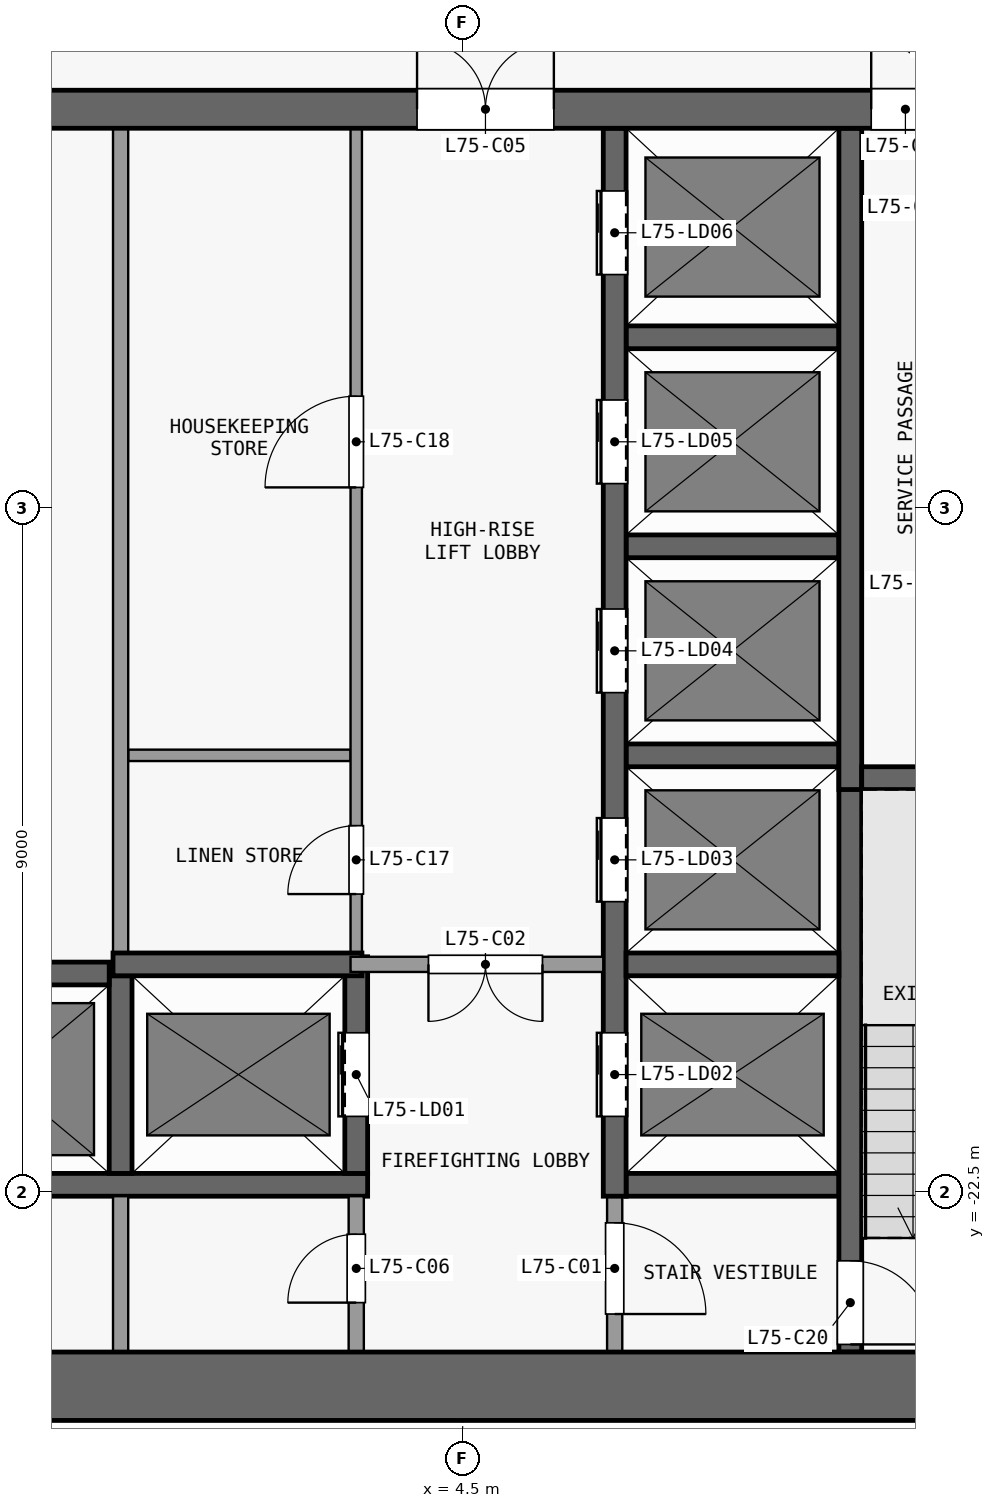
"""IFC4 building model, lengths in metres.
Left out: names, types, materials, properties, quantities, classifications, styles, units other than length and angle.
Written with IfcOpenShell. Run it as: python <this file> out.ifc"""

import sys

from ifc_helpers import new_model, si_unit, direction, frame, frame_2d, origin, place, context, subcontext, project, spatial, rectangle, extrude, element, fill, save


model = new_model("IFC4")
c1 = context("Model", 3, precision=1e-05, world=origin(), true_north=direction((0.0, 1.0)))
c2 = subcontext(c1, "Body", "Model", "MODEL_VIEW")
j1 = project(units=[si_unit("LENGTHUNIT", "METRE"), si_unit("PLANEANGLEUNIT", "RADIAN")], contexts=[c1])
p1 = place(None, origin())
s1 = spatial("IfcSite", under=j1, at=p1, CompositionType="ELEMENT")
p2 = place(p1, origin())
s2 = spatial("IfcBuilding", under=s1, at=p2, CompositionType="ELEMENT")
p3 = place(p2, frame((0.0, 0.0, 295.1)))
s3 = spatial("IfcBuildingStorey", under=s2, at=p3, CompositionType="ELEMENT", Elevation=295.1)
p4 = place(p3, frame((-13.1, -25.05, 0.0), z_axis=(0.0, 0.0, 1.0), x_axis=(1.0, 0.0, 0.0)))
e1 = element("IfcWall", 1, at=p4, inside=s3, PredefinedType="SHEAR", context=c2, shape_type="SweptSolid", body=[
    extrude(rectangle(XDim=26.2, YDim=0.9, at=frame_2d((13.1, 0.0))), origin(), (0.0, 0.0, 1.0), 3.2),
])
p5 = place(p3, frame((-13.1, -8.25, 0.0), z_axis=(0.0, 0.0, 1.0), x_axis=(1.0, 0.0, 0.0)))
e2 = element("IfcWall", 2, at=p5, inside=s3, PredefinedType="SHEAR", context=c2, shape_type="SweptSolid", body=[
    extrude(rectangle(XDim=26.2, YDim=0.5, at=frame_2d((13.1, 0.0))), origin(), (0.0, 0.0, 1.0), 3.2),
])
p6 = place(p5, frame((7.4, 0.0, 0.0)))
e3 = element("IfcOpeningElement", 3, at=p6, cuts=e2, PredefinedType="OPENING", context=c2, shape_type="SweptSolid", body=[
    extrude(rectangle(XDim=1.8, YDim=2.1, at=frame_2d((0.9, 1.05))), frame((0.0, 0.26, 0.0), z_axis=(0.0, -1.0, 0.0), x_axis=(1.0, 0.0, 0.0)), (0.0, 0.0, 1.0), 0.52),
])
p7 = place(p5, frame((17.0, 0.0, 0.0)))
e4 = element("IfcOpeningElement", 4, at=p7, cuts=e2, PredefinedType="OPENING", context=c2, shape_type="SweptSolid", body=[
    extrude(rectangle(XDim=1.8, YDim=2.1, at=frame_2d((0.9, 1.05))), frame((0.0, 0.26, 0.0), z_axis=(0.0, -1.0, 0.0), x_axis=(1.0, 0.0, 0.0)), (0.0, 0.0, 1.0), 0.52),
])
p8 = place(p5, frame((2.325, 0.0, 0.0)))
e5 = element("IfcOpeningElement", 5, at=p8, cuts=e2, PredefinedType="OPENING", context=c2, shape_type="SweptSolid", body=[
    extrude(rectangle(XDim=0.9, YDim=2.1, at=frame_2d((0.45, 1.05))), frame((0.0, 0.26, 0.0), z_axis=(0.0, -1.0, 0.0), x_axis=(1.0, 0.0, 0.0)), (0.0, 0.0, 1.0), 0.52),
])
p9 = place(p5, frame((22.975, 0.0, 0.0)))
e6 = element("IfcOpeningElement", 6, at=p9, cuts=e2, PredefinedType="OPENING", context=c2, shape_type="SweptSolid", body=[
    extrude(rectangle(XDim=0.9, YDim=2.1, at=frame_2d((0.45, 1.05))), frame((0.0, 0.26, 0.0), z_axis=(0.0, -1.0, 0.0), x_axis=(1.0, 0.0, 0.0)), (0.0, 0.0, 1.0), 0.52),
])
p10 = place(p3, frame((-3.25, -22.4, 0.0), z_axis=(0.0, 0.0, 1.0), x_axis=(1.0, 0.0, 0.0)))
e7 = element("IfcWall", 7, at=p10, inside=s3, PredefinedType="SHEAR", context=c2, shape_type="SweptSolid", body=[
    extrude(rectangle(XDim=6.5, YDim=0.3, at=frame_2d((3.25, 0.0))), origin(), (0.0, 0.0, 1.0), 3.2),
])
p11 = place(p3, frame((6.65, -22.4, 0.0), z_axis=(0.0, 0.0, 1.0), x_axis=(1.0, 0.0, 0.0)))
e8 = element("IfcWall", 8, at=p11, inside=s3, PredefinedType="SHEAR", context=c2, shape_type="SweptSolid", body=[
    extrude(rectangle(XDim=2.8, YDim=0.3, at=frame_2d((1.4, 0.0))), origin(), (0.0, 0.0, 1.0), 3.2),
])
p12 = place(p3, frame((-3.2, -19.62, 0.0), z_axis=(0.0, 0.0, 1.0), x_axis=(1.0, 0.0, 0.0)))
e9 = element("IfcWall", 9, at=p12, inside=s3, PredefinedType="SHEAR", context=c2, shape_type="SweptSolid", body=[
    extrude(rectangle(XDim=3.05, YDim=0.3, at=frame_2d((1.525, 0.0))), origin(), (0.0, 0.0, 1.0), 3.2),
])
p13 = place(p3, frame((-0.1, -19.5, 0.0), z_axis=(0.0, 0.0, 1.0), x_axis=(1.0, 0.0, 0.0)))
e10 = element("IfcWall", 10, at=p13, inside=s3, PredefinedType="SHEAR", context=c2, shape_type="SweptSolid", body=[
    extrude(rectangle(XDim=3.275, YDim=0.3, at=frame_2d((1.638, 0.0))), origin(), (0.0, 0.0, 1.0), 3.2),
])
p14 = place(p3, frame((6.35, -19.5, 0.0), z_axis=(0.0, 0.0, 1.0), x_axis=(-1.0, 0.0, 0.0)))
e11 = element("IfcWall", 11, at=p14, inside=s3, PredefinedType="PARTITIONING", context=c2, shape_type="SweptSolid", body=[
    extrude(rectangle(XDim=3.325, YDim=0.2, at=frame_2d((1.663, 0.0))), origin(), (0.0, 0.0, 1.0), 3.2),
])
p15 = place(p14, frame((0.8, 0.0, 0.0)))
e12 = element("IfcOpeningElement", 12, at=p15, cuts=e11, PredefinedType="OPENING", context=c2, shape_type="SweptSolid", body=[
    extrude(rectangle(XDim=1.5, YDim=2.1, at=frame_2d((0.75, 1.05))), frame((0.0, 0.11, 0.0), z_axis=(0.0, -1.0, 0.0), x_axis=(1.0, 0.0, 0.0)), (0.0, 0.0, 1.0), 0.22),
])
p16 = place(p3, frame((6.65, -19.5, 0.0), z_axis=(0.0, 0.0, 1.0), x_axis=(1.0, 0.0, 0.0)))
e13 = element("IfcWall", 13, at=p16, inside=s3, PredefinedType="SHEAR", context=c2, shape_type="SweptSolid", body=[
    extrude(rectangle(XDim=2.8, YDim=0.3, at=frame_2d((1.4, 0.0))), origin(), (0.0, 0.0, 1.0), 3.2),
])
p17 = place(p3, frame((9.75, -17.05, 0.0), z_axis=(0.0, 0.0, 1.0), x_axis=(1.0, 0.0, 0.0)))
e14 = element("IfcWall", 14, at=p17, inside=s3, PredefinedType="SHEAR", context=c2, shape_type="SweptSolid", body=[
    extrude(rectangle(XDim=2.85, YDim=0.3, at=frame_2d((1.425, 0.0))), origin(), (0.0, 0.0, 1.0), 3.2),
])
p18 = place(p3, frame((0.1, -16.75, 0.0), z_axis=(0.0, 0.0, 1.0), x_axis=(1.0, 0.0, 0.0)))
e15 = element("IfcWall", 15, at=p18, inside=s3, PredefinedType="PARTITIONING", context=c2, shape_type="SweptSolid", body=[
    extrude(rectangle(XDim=2.925, YDim=0.15, at=frame_2d((1.462, 0.0))), origin(), (0.0, 0.0, 1.0), 3.2),
])
for number, where, z_axis, x_axis in (
    (16, (6.65, -16.75, 0.0), (0.0, 0.0, 1.0), (1.0, 0.0, 0.0)),
    (17, (6.65, -14.0, 0.0), (0.0, 0.0, 1.0), (1.0, 0.0, 0.0)),
    (18, (6.65, -11.25, 0.0), (0.0, 0.0, 1.0), (1.0, 0.0, 0.0)),
):
    element("IfcWall", number, at=place(p3, frame(where, z_axis=z_axis, x_axis=x_axis)), inside=s3, PredefinedType="SHEAR", context=c2, shape_type="SweptSolid", body=[
        extrude(rectangle(XDim=2.8, YDim=0.3, at=frame_2d((1.4, 0.0))), origin(), (0.0, 0.0, 1.0), 3.2),
    ])
p19 = place(p3, frame((0.0, -24.6, 0.0), z_axis=(0.0, 0.0, 1.0), x_axis=(0.0, 1.0, 0.0)))
e19 = element("IfcWall", 19, at=p19, inside=s3, PredefinedType="PARTITIONING", context=c2, shape_type="SweptSolid", body=[
    extrude(rectangle(XDim=2.05, YDim=0.2, at=frame_2d((1.025, 0.0))), origin(), (0.0, 0.0, 1.0), 3.2),
])
p20 = place(p3, frame((0.0, -22.25, 0.0), z_axis=(0.0, 0.0, 1.0), x_axis=(0.0, 1.0, 0.0)))
e20 = element("IfcWall", 20, at=p20, inside=s3, PredefinedType="SHEAR", context=c2, shape_type="SweptSolid", body=[
    extrude(rectangle(XDim=2.6, YDim=0.3, at=frame_2d((1.3, 0.0))), origin(), (0.0, 0.0, 1.0), 3.2),
])
p21 = place(p3, frame((0.0, -19.35, 0.0), z_axis=(0.0, 0.0, 1.0), x_axis=(0.0, 1.0, 0.0)))
e21 = element("IfcWall", 21, at=p21, inside=s3, PredefinedType="PARTITIONING", context=c2, shape_type="SweptSolid", body=[
    extrude(rectangle(XDim=10.85, YDim=0.2, at=frame_2d((5.425, 0.0))), origin(), (0.0, 0.0, 1.0), 3.2),
])
p22 = place(p3, frame((3.1, -24.6, 0.0), z_axis=(0.0, 0.0, 1.0), x_axis=(0.0, 1.0, 0.0)))
e22 = element("IfcWall", 22, at=p22, inside=s3, PredefinedType="PARTITIONING", context=c2, shape_type="SweptSolid", body=[
    extrude(rectangle(XDim=2.05, YDim=0.2, at=frame_2d((1.025, 0.0))), origin(), (0.0, 0.0, 1.0), 3.2),
])
p23 = place(p22, frame((0.65, 0.0, 0.0)))
e23 = element("IfcOpeningElement", 23, at=p23, cuts=e22, PredefinedType="OPENING", context=c2, shape_type="SweptSolid", body=[
    extrude(rectangle(XDim=0.9, YDim=2.1, at=frame_2d((0.45, 1.05))), frame((0.0, 0.11, 0.0), z_axis=(0.0, -1.0, 0.0), x_axis=(1.0, 0.0, 0.0)), (0.0, 0.0, 1.0), 0.22),
])
p24 = place(p3, frame((3.1, -22.25, 0.0), z_axis=(0.0, 0.0, 1.0), x_axis=(0.0, 1.0, 0.0)))
e24 = element("IfcWall", 24, at=p24, inside=s3, PredefinedType="SHEAR", context=c2, shape_type="SweptSolid", body=[
    extrude(rectangle(XDim=2.85, YDim=0.3, at=frame_2d((1.425, 0.0))), origin(), (0.0, 0.0, 1.0), 3.2),
])
p25 = place(p24, frame((0.75, 0.0, 0.0)))
e25 = element("IfcOpeningElement", 25, at=p25, cuts=e24, PredefinedType="OPENING", context=c2, shape_type="SweptSolid", body=[
    extrude(rectangle(XDim=1.1, YDim=2.1, at=frame_2d((0.55, 1.05))), frame((0.0, 0.16, 0.0), z_axis=(0.0, -1.0, 0.0), x_axis=(1.0, 0.0, 0.0)), (0.0, 0.0, 1.0), 0.32),
])
p26 = place(p3, frame((3.1, -19.4, 0.0), z_axis=(0.0, 0.0, 1.0), x_axis=(0.0, 1.0, 0.0)))
e26 = element("IfcWall", 26, at=p26, inside=s3, PredefinedType="PARTITIONING", context=c2, shape_type="SweptSolid", body=[
    extrude(rectangle(XDim=10.9, YDim=0.15, at=frame_2d((5.45, 0.0))), origin(), (0.0, 0.0, 1.0), 3.2),
])
p27 = place(p26, frame((0.825, 0.0, 0.0)))
e27 = element("IfcOpeningElement", 27, at=p27, cuts=e26, PredefinedType="OPENING", context=c2, shape_type="SweptSolid", body=[
    extrude(rectangle(XDim=0.9, YDim=2.1, at=frame_2d((0.45, 1.05))), frame((0.0, 0.085, 0.0), z_axis=(0.0, -1.0, 0.0), x_axis=(1.0, 0.0, 0.0)), (0.0, 0.0, 1.0), 0.17),
])
p28 = place(p26, frame((6.175, 0.0, 0.0)))
e28 = element("IfcOpeningElement", 28, at=p28, cuts=e26, PredefinedType="OPENING", context=c2, shape_type="SweptSolid", body=[
    extrude(rectangle(XDim=1.2, YDim=2.1, at=frame_2d((0.6, 1.05))), frame((0.0, 0.085, 0.0), z_axis=(0.0, -1.0, 0.0), x_axis=(1.0, 0.0, 0.0)), (0.0, 0.0, 1.0), 0.17),
])
p29 = place(p3, frame((6.5, -22.55, 0.0), z_axis=(0.0, 0.0, 1.0), x_axis=(0.0, -1.0, 0.0)))
e29 = element("IfcWall", 29, at=p29, inside=s3, PredefinedType="PARTITIONING", context=c2, shape_type="SweptSolid", body=[
    extrude(rectangle(XDim=2.05, YDim=0.2, at=frame_2d((1.025, 0.0))), origin(), (0.0, 0.0, 1.0), 3.2),
])
p30 = place(p29, frame((0.35, 0.0, 0.0)))
e30 = element("IfcOpeningElement", 30, at=p30, cuts=e29, PredefinedType="OPENING", context=c2, shape_type="SweptSolid", body=[
    extrude(rectangle(XDim=1.2, YDim=2.1, at=frame_2d((0.6, 1.05))), frame((0.0, 0.11, 0.0), z_axis=(0.0, -1.0, 0.0), x_axis=(1.0, 0.0, 0.0)), (0.0, 0.0, 1.0), 0.22),
])
p31 = place(p3, frame((6.5, -22.55, 0.0), z_axis=(0.0, 0.0, 1.0), x_axis=(0.0, 1.0, 0.0)))
e31 = element("IfcWall", 31, at=p31, inside=s3, PredefinedType="SHEAR", context=c2, shape_type="SweptSolid", body=[
    extrude(rectangle(XDim=14.05, YDim=0.3, at=frame_2d((7.025, 0.0))), origin(), (0.0, 0.0, 1.0), 3.2),
])
p32 = place(p31, frame((1.05, 0.0, 0.0)))
e32 = element("IfcOpeningElement", 32, at=p32, cuts=e31, PredefinedType="OPENING", context=c2, shape_type="SweptSolid", body=[
    extrude(rectangle(XDim=1.1, YDim=2.1, at=frame_2d((0.55, 1.05))), frame((0.0, 0.16, 0.0), z_axis=(0.0, -1.0, 0.0), x_axis=(1.0, 0.0, 0.0)), (0.0, 0.0, 1.0), 0.32),
])
p33 = place(p31, frame((3.875, 0.0, 0.0)))
e33 = element("IfcOpeningElement", 33, at=p33, cuts=e31, PredefinedType="OPENING", context=c2, shape_type="SweptSolid", body=[
    extrude(rectangle(XDim=1.1, YDim=2.1, at=frame_2d((0.55, 1.05))), frame((0.0, 0.16, 0.0), z_axis=(0.0, -1.0, 0.0), x_axis=(1.0, 0.0, 0.0)), (0.0, 0.0, 1.0), 0.32),
])
p34 = place(p31, frame((6.625, 0.0, 0.0)))
e34 = element("IfcOpeningElement", 34, at=p34, cuts=e31, PredefinedType="OPENING", context=c2, shape_type="SweptSolid", body=[
    extrude(rectangle(XDim=1.1, YDim=2.1, at=frame_2d((0.55, 1.05))), frame((0.0, 0.16, 0.0), z_axis=(0.0, -1.0, 0.0), x_axis=(1.0, 0.0, 0.0)), (0.0, 0.0, 1.0), 0.32),
])
p35 = place(p31, frame((9.375, 0.0, 0.0)))
e35 = element("IfcOpeningElement", 35, at=p35, cuts=e31, PredefinedType="OPENING", context=c2, shape_type="SweptSolid", body=[
    extrude(rectangle(XDim=1.1, YDim=2.1, at=frame_2d((0.55, 1.05))), frame((0.0, 0.16, 0.0), z_axis=(0.0, -1.0, 0.0), x_axis=(1.0, 0.0, 0.0)), (0.0, 0.0, 1.0), 0.32),
])
p36 = place(p31, frame((12.125, 0.0, 0.0)))
e36 = element("IfcOpeningElement", 36, at=p36, cuts=e31, PredefinedType="OPENING", context=c2, shape_type="SweptSolid", body=[
    extrude(rectangle(XDim=1.1, YDim=2.1, at=frame_2d((0.55, 1.05))), frame((0.0, 0.16, 0.0), z_axis=(0.0, -1.0, 0.0), x_axis=(1.0, 0.0, 0.0)), (0.0, 0.0, 1.0), 0.32),
])
p37 = place(p3, frame((9.6, -16.9, 0.0), z_axis=(0.0, 0.0, 1.0), x_axis=(0.0, -1.0, 0.0)))
e37 = element("IfcWall", 37, at=p37, inside=s3, PredefinedType="SHEAR", context=c2, shape_type="SweptSolid", body=[
    extrude(rectangle(XDim=7.7, YDim=0.3, at=frame_2d((3.85, 0.0))), origin(), (0.0, 0.0, 1.0), 3.2),
])
p38 = place(p37, frame((6.5, 0.0, 0.0)))
e38 = element("IfcOpeningElement", 38, at=p38, cuts=e37, PredefinedType="OPENING", context=c2, shape_type="SweptSolid", body=[
    extrude(rectangle(XDim=1.1, YDim=2.1, at=frame_2d((0.55, 1.05))), frame((0.0, 0.16, 0.0), z_axis=(0.0, -1.0, 0.0), x_axis=(1.0, 0.0, 0.0)), (0.0, 0.0, 1.0), 0.32),
])
p39 = place(p3, frame((9.6, -17.2, 0.0), z_axis=(0.0, 0.0, 1.0), x_axis=(0.0, 1.0, 0.0)))
e39 = element("IfcWall", 39, at=p39, inside=s3, PredefinedType="SHEAR", context=c2, shape_type="SweptSolid", body=[
    extrude(rectangle(XDim=8.7, YDim=0.3, at=frame_2d((4.35, 0.0))), origin(), (0.0, 0.0, 1.0), 3.2),
])
p40 = place(p25, origin())
e40 = element("IfcDoor", 40, at=p40, inside=s3, OperationType="DOUBLE_DOOR_SLIDING", PredefinedType="DOOR", context=c2, shape_type="SweptSolid", body=[
    extrude(rectangle(XDim=1.1, YDim=2.1, at=frame_2d((0.55, 1.05))), frame((0.0, 0.025, 0.0), z_axis=(0.0, -1.0, 0.0), x_axis=(1.0, 0.0, 0.0)), (0.0, 0.0, 1.0), 0.05),
])
fill(e25, e40)
p41 = place(p32, origin())
e41 = element("IfcDoor", 41, at=p41, inside=s3, OperationType="DOUBLE_DOOR_SLIDING", PredefinedType="DOOR", context=c2, shape_type="SweptSolid", body=[
    extrude(rectangle(XDim=1.1, YDim=2.1, at=frame_2d((0.55, 1.05))), frame((0.0, 0.025, 0.0), z_axis=(0.0, -1.0, 0.0), x_axis=(1.0, 0.0, 0.0)), (0.0, 0.0, 1.0), 0.05),
])
fill(e32, e41)
p42 = place(p33, origin())
e42 = element("IfcDoor", 42, at=p42, inside=s3, OperationType="DOUBLE_DOOR_SLIDING", PredefinedType="DOOR", context=c2, shape_type="SweptSolid", body=[
    extrude(rectangle(XDim=1.1, YDim=2.1, at=frame_2d((0.55, 1.05))), frame((0.0, 0.025, 0.0), z_axis=(0.0, -1.0, 0.0), x_axis=(1.0, 0.0, 0.0)), (0.0, 0.0, 1.0), 0.05),
])
fill(e33, e42)
p43 = place(p34, origin())
e43 = element("IfcDoor", 43, at=p43, inside=s3, OperationType="DOUBLE_DOOR_SLIDING", PredefinedType="DOOR", context=c2, shape_type="SweptSolid", body=[
    extrude(rectangle(XDim=1.1, YDim=2.1, at=frame_2d((0.55, 1.05))), frame((0.0, 0.025, 0.0), z_axis=(0.0, -1.0, 0.0), x_axis=(1.0, 0.0, 0.0)), (0.0, 0.0, 1.0), 0.05),
])
fill(e34, e43)
p44 = place(p35, origin())
e44 = element("IfcDoor", 44, at=p44, inside=s3, OperationType="DOUBLE_DOOR_SLIDING", PredefinedType="DOOR", context=c2, shape_type="SweptSolid", body=[
    extrude(rectangle(XDim=1.1, YDim=2.1, at=frame_2d((0.55, 1.05))), frame((0.0, 0.025, 0.0), z_axis=(0.0, -1.0, 0.0), x_axis=(1.0, 0.0, 0.0)), (0.0, 0.0, 1.0), 0.05),
])
fill(e35, e44)
p45 = place(p36, origin())
e45 = element("IfcDoor", 45, at=p45, inside=s3, OperationType="DOUBLE_DOOR_SLIDING", PredefinedType="DOOR", context=c2, shape_type="SweptSolid", body=[
    extrude(rectangle(XDim=1.1, YDim=2.1, at=frame_2d((0.55, 1.05))), frame((0.0, 0.025, 0.0), z_axis=(0.0, -1.0, 0.0), x_axis=(1.0, 0.0, 0.0)), (0.0, 0.0, 1.0), 0.05),
])
fill(e36, e45)
p46 = place(p30, origin())
e46 = element("IfcDoor", 46, at=p46, inside=s3, OperationType="SINGLE_SWING_RIGHT", PredefinedType="DOOR", context=c2, shape_type="SweptSolid", body=[
    extrude(rectangle(XDim=1.2, YDim=2.1, at=frame_2d((0.6, 1.05))), frame((0.0, 0.025, 0.0), z_axis=(0.0, -1.0, 0.0), x_axis=(1.0, 0.0, 0.0)), (0.0, 0.0, 1.0), 0.05),
])
fill(e30, e46)
p47 = place(p15, origin())
e47 = element("IfcDoor", 47, at=p47, inside=s3, OperationType="DOUBLE_DOOR_SINGLE_SWING", PredefinedType="DOOR", context=c2, shape_type="SweptSolid", body=[
    extrude(rectangle(XDim=1.5, YDim=2.1, at=frame_2d((0.75, 1.05))), frame((0.0, 0.025, 0.0), z_axis=(0.0, -1.0, 0.0), x_axis=(1.0, 0.0, 0.0)), (0.0, 0.0, 1.0), 0.05),
])
fill(e12, e47)
p48 = place(p7, origin())
e48 = element("IfcDoor", 48, at=p48, inside=s3, OperationType="DOUBLE_DOOR_SINGLE_SWING", PredefinedType="DOOR", context=c2, shape_type="SweptSolid", body=[
    extrude(rectangle(XDim=1.8, YDim=2.1, at=frame_2d((0.9, 1.05))), frame((0.0, 0.025, 0.0), z_axis=(0.0, -1.0, 0.0), x_axis=(1.0, 0.0, 0.0)), (0.0, 0.0, 1.0), 0.05),
])
fill(e4, e48)
p49 = place(p23, origin())
e49 = element("IfcDoor", 49, at=p49, inside=s3, OperationType="SINGLE_SWING_LEFT", PredefinedType="DOOR", context=c2, shape_type="SweptSolid", body=[
    extrude(rectangle(XDim=0.9, YDim=2.1, at=frame_2d((0.45, 1.05))), frame((0.0, 0.025, 0.0), z_axis=(0.0, -1.0, 0.0), x_axis=(1.0, 0.0, 0.0)), (0.0, 0.0, 1.0), 0.05),
])
fill(e23, e49)
p50 = place(p9, origin())
e50 = element("IfcDoor", 50, at=p50, inside=s3, OperationType="SINGLE_SWING_LEFT", PredefinedType="DOOR", context=c2, shape_type="SweptSolid", body=[
    extrude(rectangle(XDim=0.9, YDim=2.1, at=frame_2d((0.45, 1.05))), frame((0.0, 0.025, 0.0), z_axis=(0.0, -1.0, 0.0), x_axis=(1.0, 0.0, 0.0)), (0.0, 0.0, 1.0), 0.05),
])
fill(e6, e50)
p51 = place(p27, origin())
e51 = element("IfcDoor", 51, at=p51, inside=s3, OperationType="SINGLE_SWING_LEFT", PredefinedType="DOOR", context=c2, shape_type="SweptSolid", body=[
    extrude(rectangle(XDim=0.9, YDim=2.1, at=frame_2d((0.45, 1.05))), frame((0.0, 0.025, 0.0), z_axis=(0.0, -1.0, 0.0), x_axis=(1.0, 0.0, 0.0)), (0.0, 0.0, 1.0), 0.05),
])
fill(e27, e51)
p52 = place(p28, origin())
e52 = element("IfcDoor", 52, at=p52, inside=s3, OperationType="SINGLE_SWING_LEFT", PredefinedType="DOOR", context=c2, shape_type="SweptSolid", body=[
    extrude(rectangle(XDim=1.2, YDim=2.1, at=frame_2d((0.6, 1.05))), frame((0.0, 0.025, 0.0), z_axis=(0.0, -1.0, 0.0), x_axis=(1.0, 0.0, 0.0)), (0.0, 0.0, 1.0), 0.05),
])
fill(e28, e52)
p53 = place(p38, origin())
e53 = element("IfcDoor", 53, at=p53, inside=s3, OperationType="SINGLE_SWING_RIGHT", PredefinedType="DOOR", context=c2, shape_type="SweptSolid", body=[
    extrude(rectangle(XDim=1.1, YDim=2.1, at=frame_2d((0.55, 1.05))), frame((0.0, 0.025, 0.0), z_axis=(0.0, -1.0, 0.0), x_axis=(1.0, 0.0, 0.0)), (0.0, 0.0, 1.0), 0.05),
])
fill(e38, e53)
save(model, sys.argv[1])
